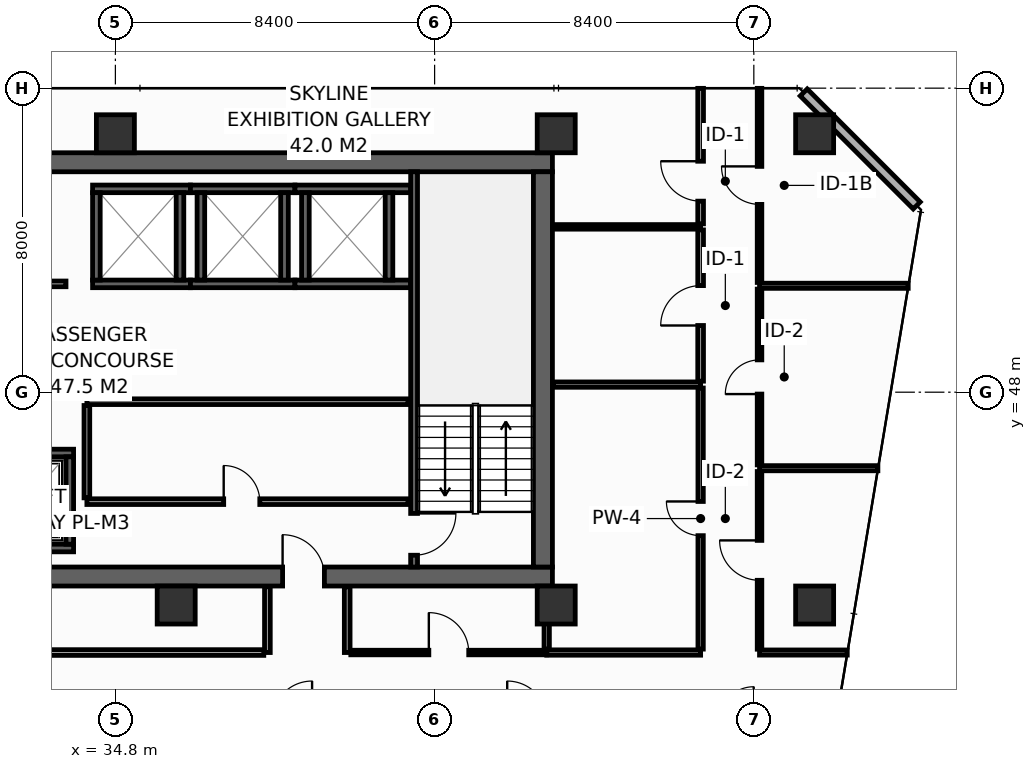
"""IFC4 building model, lengths in metres.
Left out: names, types, materials, properties, quantities, classifications, styles, units other than length and angle.
Written with IfcOpenShell. Run it as: python <this file> out.ifc"""

import sys

from ifc_helpers import new_model, si_unit, direction, frame, frame_2d, origin, origin_2d, place, context, subcontext, project, spatial, rectangle, hollow_rectangle, extrude, element, fill, save


model = new_model("IFC4")
c1 = context("Model", 3, precision=1e-05, world=origin(), true_north=direction((0.0, 1.0)))
c2 = subcontext(c1, "Body", "Model", "MODEL_VIEW")
j1 = project(units=[si_unit("LENGTHUNIT", "METRE"), si_unit("PLANEANGLEUNIT", "RADIAN")], contexts=[c1])
p1 = place(None, origin())
s1 = spatial("IfcSite", under=j1, at=p1, CompositionType="ELEMENT")
p2 = place(p1, origin())
s2 = spatial("IfcBuilding", under=s1, at=p2, CompositionType="ELEMENT")
p3 = place(p2, frame((0.0, 0.0, 152.4)))
s3 = spatial("IfcBuildingStorey", under=s2, at=p3, CompositionType="ELEMENT", Elevation=152.4)
p4 = place(p3, frame((13.6, 43.15, 0.0), z_axis=(0.0, 0.0, 1.0), x_axis=(1.0, 0.0, 0.0)))
e1 = element("IfcWall", 1, at=p4, inside=s3, PredefinedType="SHEAR", context=c2, shape_type="SweptSolid", body=[
    extrude(rectangle(XDim=32.7, YDim=0.5, at=frame_2d((16.35, 0.0))), origin(), (0.0, 0.0, 1.0), 3.55),
])
p5 = place(p4, frame((5.4, 0.0, 0.0)))
e2 = element("IfcOpeningElement", 2, at=p5, cuts=e1, PredefinedType="OPENING", context=c2, shape_type="SweptSolid", body=[
    extrude(rectangle(XDim=1.1, YDim=2.15, at=frame_2d((0.55, 1.075))), frame((0.0, 0.26, 0.0), z_axis=(0.0, -1.0, 0.0), x_axis=(1.0, 0.0, 0.0)), (0.0, 0.0, 1.0), 0.52),
])
p6 = place(p4, frame((25.6, 0.0, 0.0)))
e3 = element("IfcOpeningElement", 3, at=p6, cuts=e1, PredefinedType="OPENING", context=c2, shape_type="SweptSolid", body=[
    extrude(rectangle(XDim=1.1, YDim=2.15, at=frame_2d((0.55, 1.075))), frame((0.0, 0.26, 0.0), z_axis=(0.0, -1.0, 0.0), x_axis=(1.0, 0.0, 0.0)), (0.0, 0.0, 1.0), 0.52),
])
p7 = place(p3, frame((13.6, 54.05, 0.0), z_axis=(0.0, 0.0, 1.0), x_axis=(1.0, 0.0, 0.0)))
e4 = element("IfcWall", 4, at=p7, inside=s3, PredefinedType="SHEAR", context=c2, shape_type="SweptSolid", body=[
    extrude(rectangle(XDim=32.7, YDim=0.5, at=frame_2d((16.35, 0.0))), origin(), (0.0, 0.0, 1.0), 3.55),
])
p8 = place(p3, frame((46.05, 43.4, 0.0), z_axis=(0.0, 0.0, 1.0), x_axis=(0.0, 1.0, 0.0)))
e5 = element("IfcWall", 5, at=p8, inside=s3, PredefinedType="SHEAR", context=c2, shape_type="SweptSolid", body=[
    extrude(rectangle(XDim=10.4, YDim=0.5, at=frame_2d((5.2, 0.0))), origin(), (0.0, 0.0, 1.0), 3.55),
])
for number, where, z_axis, x_axis in (
    (6, (34.8, 54.8, 0.0), (0.0, 0.0, 1.0), (1.0, 0.0, 0.0)),
    (7, (46.4, 54.8, 0.0), (0.0, 0.0, 1.0), (1.0, 0.0, 0.0)),
    (8, (53.2, 54.8, 0.0), (0.0, 0.0, 1.0), (1.0, 0.0, 0.0)),
    (9, (36.4, 42.4, 0.0), (0.0, 0.0, 1.0), (1.0, 0.0, 0.0)),
    (10, (46.4, 42.4, 0.0), (0.0, 0.0, 1.0), (1.0, 0.0, 0.0)),
    (11, (53.2, 42.4, 0.0), (0.0, 0.0, 1.0), (1.0, 0.0, 0.0)),
):
    element("IfcColumn", number, at=place(p3, frame(where, z_axis=z_axis, x_axis=x_axis)), inside=s3, PredefinedType="COLUMN", context=c2, shape_type="SweptSolid", body=[
        extrude(hollow_rectangle(XDim=1.0, YDim=1.0, WallThickness=0.045, at=origin_2d()), origin(), (0.0, 0.0, 1.0), 3.8),
    ])
p9 = place(p3, frame((31.125, 43.9, 0.0), z_axis=(0.0, 0.0, 1.0), x_axis=(1.0, 0.0, 0.0)))
e12 = element("IfcWall", 12, at=p9, inside=s3, PredefinedType="SHEAR", context=c2, shape_type="SweptSolid", body=[
    extrude(rectangle(XDim=2.575, YDim=0.2, at=frame_2d((1.288, 0.0))), origin(), (0.0, 0.0, 1.0), 3.55),
])
p10 = place(p3, frame((31.125, 46.4, 0.0), z_axis=(0.0, 0.0, 1.0), x_axis=(1.0, 0.0, 0.0)))
e13 = element("IfcWall", 13, at=p10, inside=s3, PredefinedType="SHEAR", context=c2, shape_type="SweptSolid", body=[
    extrude(rectangle(XDim=2.575, YDim=0.2, at=frame_2d((1.288, 0.0))), origin(), (0.0, 0.0, 1.0), 3.55),
])
p11 = place(p10, frame((0.825, 0.0, 0.0)))
e14 = element("IfcOpeningElement", 14, at=p11, cuts=e13, PredefinedType="OPENING", context=c2, shape_type="SweptSolid", body=[
    extrude(rectangle(XDim=1.1, YDim=2.2, at=frame_2d((0.55, 1.1))), frame((0.0, 0.11, 0.0), z_axis=(0.0, -1.0, 0.0), x_axis=(1.0, 0.0, 0.0)), (0.0, 0.0, 1.0), 0.22),
])
p12 = place(p3, frame((33.6, 44.0, 0.0), z_axis=(0.0, 0.0, 1.0), x_axis=(0.0, 1.0, 0.0)))
e15 = element("IfcWall", 15, at=p12, inside=s3, PredefinedType="SHEAR", context=c2, shape_type="SweptSolid", body=[
    extrude(rectangle(XDim=2.3, YDim=0.2, at=frame_2d((1.15, 0.0))), origin(), (0.0, 0.0, 1.0), 3.55),
])
for number, where, z_axis, x_axis in (
    (16, (34.2, 50.85, 0.0), (0.0, 0.0, 1.0), (1.0, 0.0, 0.0)),
    (17, (34.2, 53.35, 0.0), (0.0, 0.0, 1.0), (1.0, 0.0, 0.0)),
):
    element("IfcWall", number, at=place(p3, frame(where, z_axis=z_axis, x_axis=x_axis)), inside=s3, PredefinedType="SHEAR", context=c2, shape_type="SweptSolid", body=[
        extrude(rectangle(XDim=2.575, YDim=0.2, at=frame_2d((1.288, 0.0))), origin(), (0.0, 0.0, 1.0), 3.55),
    ])
for number, where, z_axis, x_axis in (
    (18, (34.3, 50.95, 0.0), (0.0, 0.0, 1.0), (0.0, 1.0, 0.0)),
    (19, (36.5, 50.95, 0.0), (0.0, 0.0, 1.0), (0.0, 1.0, 0.0)),
):
    element("IfcWall", number, at=place(p3, frame(where, z_axis=z_axis, x_axis=x_axis)), inside=s3, PredefinedType="SHEAR", context=c2, shape_type="SweptSolid", body=[
        extrude(rectangle(XDim=2.3, YDim=0.2, at=frame_2d((1.15, 0.0))), origin(), (0.0, 0.0, 1.0), 3.55),
    ])
for number, where, z_axis, x_axis in (
    (20, (36.775, 50.85, 0.0), (0.0, 0.0, 1.0), (1.0, 0.0, 0.0)),
    (21, (36.775, 53.35, 0.0), (0.0, 0.0, 1.0), (1.0, 0.0, 0.0)),
):
    element("IfcWall", number, at=place(p3, frame(where, z_axis=z_axis, x_axis=x_axis)), inside=s3, PredefinedType="SHEAR", context=c2, shape_type="SweptSolid", body=[
        extrude(rectangle(XDim=2.75, YDim=0.2, at=frame_2d((1.375, 0.0))), origin(), (0.0, 0.0, 1.0), 3.55),
    ])
for number, where, z_axis, x_axis in (
    (22, (37.05, 50.95, 0.0), (0.0, 0.0, 1.0), (0.0, 1.0, 0.0)),
    (23, (39.25, 50.95, 0.0), (0.0, 0.0, 1.0), (0.0, 1.0, 0.0)),
):
    element("IfcWall", number, at=place(p3, frame(where, z_axis=z_axis, x_axis=x_axis)), inside=s3, PredefinedType="SHEAR", context=c2, shape_type="SweptSolid", body=[
        extrude(rectangle(XDim=2.3, YDim=0.2, at=frame_2d((1.15, 0.0))), origin(), (0.0, 0.0, 1.0), 3.55),
    ])
for number, where, z_axis, x_axis in (
    (24, (39.525, 50.85, 0.0), (0.0, 0.0, 1.0), (1.0, 0.0, 0.0)),
    (25, (39.525, 53.35, 0.0), (0.0, 0.0, 1.0), (1.0, 0.0, 0.0)),
):
    element("IfcWall", number, at=place(p3, frame(where, z_axis=z_axis, x_axis=x_axis)), inside=s3, PredefinedType="SHEAR", context=c2, shape_type="SweptSolid", body=[
        extrude(rectangle(XDim=3.045, YDim=0.2, at=frame_2d((1.522, 0.0))), origin(), (0.0, 0.0, 1.0), 3.55),
    ])
for number, where, z_axis, x_axis in (
    (26, (39.8, 50.95, 0.0), (0.0, 0.0, 1.0), (0.0, 1.0, 0.0)),
    (27, (42.0, 50.95, 0.0), (0.0, 0.0, 1.0), (0.0, 1.0, 0.0)),
):
    element("IfcWall", number, at=place(p3, frame(where, z_axis=z_axis, x_axis=x_axis)), inside=s3, PredefinedType="SHEAR", context=c2, shape_type="SweptSolid", body=[
        extrude(rectangle(XDim=2.3, YDim=0.2, at=frame_2d((1.15, 0.0))), origin(), (0.0, 0.0, 1.0), 3.55),
    ])
p13 = place(p3, frame((42.66, 53.8, 0.0), z_axis=(0.0, 0.0, 1.0), x_axis=(0.0, -1.0, 0.0)))
e28 = element("IfcWall", 28, at=p13, inside=s3, PredefinedType="SHEAR", context=c2, shape_type="SweptSolid", body=[
    extrude(rectangle(XDim=10.4, YDim=0.18, at=frame_2d((5.2, 0.0))), origin(), (0.0, 0.0, 1.0), 3.55),
])
p14 = place(p13, frame((8.99, 0.0, 0.0)))
e29 = element("IfcOpeningElement", 29, at=p14, cuts=e28, PredefinedType="OPENING", context=c2, shape_type="SweptSolid", body=[
    extrude(rectangle(XDim=1.1, YDim=2.15, at=frame_2d((0.55, 1.075))), frame((0.0, 0.1, 0.0), z_axis=(0.0, -1.0, 0.0), x_axis=(1.0, 0.0, 0.0)), (0.0, 0.0, 1.0), 0.2),
])
p15 = place(p3, frame((34.05, 45.12, 0.0), z_axis=(0.0, 0.0, 1.0), x_axis=(1.0, 0.0, 0.0)))
e30 = element("IfcWall", 30, at=p15, inside=s3, PredefinedType="PARTITIONING", context=c2, shape_type="SweptSolid", body=[
    extrude(rectangle(XDim=8.45, YDim=0.15, at=frame_2d((4.225, 0.0))), origin(), (0.0, 0.0, 1.0), 3.55),
])
p16 = place(p15, frame((3.6, 0.0, 0.0)))
e31 = element("IfcOpeningElement", 31, at=p16, cuts=e30, PredefinedType="OPENING", context=c2, shape_type="SweptSolid", body=[
    extrude(rectangle(XDim=0.95, YDim=2.15, at=frame_2d((0.475, 1.075))), frame((0.0, 0.085, 0.0), z_axis=(0.0, -1.0, 0.0), x_axis=(1.0, 0.0, 0.0)), (0.0, 0.0, 1.0), 0.17),
])
p17 = place(p3, frame((34.05, 47.75, 0.0), z_axis=(0.0, 0.0, 1.0), x_axis=(1.0, 0.0, 0.0)))
e32 = element("IfcWall", 32, at=p17, inside=s3, PredefinedType="PARTITIONING", context=c2, shape_type="SweptSolid", body=[
    extrude(rectangle(XDim=8.45, YDim=0.15, at=frame_2d((4.225, 0.0))), origin(), (0.0, 0.0, 1.0), 3.55),
])
p18 = place(p3, frame((34.05, 45.22, 0.0), z_axis=(0.0, 0.0, 1.0), x_axis=(0.0, 1.0, 0.0)))
e33 = element("IfcWall", 33, at=p18, inside=s3, PredefinedType="PARTITIONING", context=c2, shape_type="SweptSolid", body=[
    extrude(rectangle(XDim=2.43, YDim=0.15, at=frame_2d((1.215, 0.0))), origin(), (0.0, 0.0, 1.0), 3.55),
])
p19 = place(p3, frame((25.85, 50.85, 0.0), z_axis=(0.0, 0.0, 1.0), x_axis=(1.0, 0.0, 0.0)))
e34 = element("IfcWall", 34, at=p19, inside=s3, PredefinedType="PARTITIONING", context=c2, shape_type="SweptSolid", body=[
    extrude(rectangle(XDim=7.65, YDim=0.15, at=frame_2d((3.825, 0.0))), origin(), (0.0, 0.0, 1.0), 3.55),
])
p20 = place(p19, frame((1.25, 0.0, 0.0)))
e35 = element("IfcOpeningElement", 35, at=p20, cuts=e34, PredefinedType="OPENING", context=c2, shape_type="SweptSolid", body=[
    extrude(rectangle(XDim=0.95, YDim=2.15, at=frame_2d((0.475, 1.075))), frame((0.0, 0.085, 0.0), z_axis=(0.0, -1.0, 0.0), x_axis=(1.0, 0.0, 0.0)), (0.0, 0.0, 1.0), 0.17),
])
p21 = place(p19, frame((5.05, 0.0, 0.0)))
e36 = element("IfcOpeningElement", 36, at=p21, cuts=e34, PredefinedType="OPENING", context=c2, shape_type="SweptSolid", body=[
    extrude(rectangle(XDim=0.95, YDim=2.15, at=frame_2d((0.475, 1.075))), frame((0.0, 0.085, 0.0), z_axis=(0.0, -1.0, 0.0), x_axis=(1.0, 0.0, 0.0)), (0.0, 0.0, 1.0), 0.17),
])
p22 = place(p3, frame((55.887, 52.913, 0.0), z_axis=(0.0, 0.0, 1.0), x_axis=(-0.707106781187, 0.707106781187, 0.0)))
e37 = element("IfcWall", 37, at=p22, inside=s3, PredefinedType="STANDARD", context=c2, shape_type="SweptSolid", body=[
    extrude(rectangle(XDim=4.206, YDim=0.26, at=frame_2d((2.103, 0.0))), origin(), (0.0, 0.0, 1.0), 3.55),
])
p23 = place(p3, frame((46.15, 41.15, 0.0), z_axis=(0.0, 0.0, 1.0), x_axis=(1.0, 0.0, 0.0)))
e38 = element("IfcWall", 38, at=p23, inside=s3, PredefinedType="PARTITIONING", context=c2, shape_type="SweptSolid", body=[
    extrude(rectangle(XDim=4.05, YDim=0.14, at=frame_2d((2.025, 0.0))), origin(), (0.0, 0.0, 1.0), 3.55),
])
p24 = place(p3, frame((46.15, 41.24, 0.0), z_axis=(0.0, 0.0, 1.0), x_axis=(0.0, 1.0, 0.0)))
e39 = element("IfcWall", 39, at=p24, inside=s3, PredefinedType="PARTITIONING", context=c2, shape_type="SweptSolid", body=[
    extrude(rectangle(XDim=1.64, YDim=0.14, at=frame_2d((0.82, 0.0))), origin(), (0.0, 0.0, 1.0), 3.55),
])
p25 = place(p3, frame((46.32, 48.2, 0.0), z_axis=(0.0, 0.0, 1.0), x_axis=(1.0, 0.0, 0.0)))
e40 = element("IfcWall", 40, at=p25, inside=s3, PredefinedType="PARTITIONING", context=c2, shape_type="SweptSolid", body=[
    extrude(rectangle(XDim=3.88, YDim=0.14, at=frame_2d((1.94, 0.0))), origin(), (0.0, 0.0, 1.0), 3.55),
])
p26 = place(p3, frame((50.2, 41.24, 0.0), z_axis=(0.0, 0.0, 1.0), x_axis=(0.0, 1.0, 0.0)))
e41 = element("IfcWall", 41, at=p26, inside=s3, PredefinedType="PARTITIONING", context=c2, shape_type="SweptSolid", body=[
    extrude(rectangle(XDim=6.87, YDim=0.14, at=frame_2d((3.435, 0.0))), origin(), (0.0, 0.0, 1.0), 2.835),
])
p27 = place(p26, frame((2.985, 0.0, 0.0)))
e42 = element("IfcOpeningElement", 42, at=p27, cuts=e41, PredefinedType="OPENING", context=c2, shape_type="SweptSolid", body=[
    extrude(rectangle(XDim=0.9, YDim=2.1, at=frame_2d((0.45, 1.05))), frame((0.0, 0.08, 0.0), z_axis=(0.0, -1.0, 0.0), x_axis=(1.0, 0.0, 0.0)), (0.0, 0.0, 1.0), 0.16),
])
p28 = place(p3, frame((46.32, 52.35, 0.0), z_axis=(0.0, 0.0, 1.0), x_axis=(1.0, 0.0, 0.0)))
e43 = element("IfcWall", 43, at=p28, inside=s3, PredefinedType="PARTITIONING", context=c2, shape_type="SweptSolid", body=[
    extrude(rectangle(XDim=3.88, YDim=0.12, at=frame_2d((1.94, 0.0))), origin(), (0.0, 0.0, 1.0), 3.55),
])
p29 = place(p3, frame((50.2, 48.29, 0.0), z_axis=(0.0, 0.0, 1.0), x_axis=(0.0, 1.0, 0.0)))
e44 = element("IfcWall", 44, at=p29, inside=s3, PredefinedType="PARTITIONING", context=c2, shape_type="SweptSolid", body=[
    extrude(rectangle(XDim=3.98, YDim=0.15, at=frame_2d((1.99, 0.0))), origin(), (0.0, 0.0, 1.0), 3.55),
])
p30 = place(p29, frame((1.465, 0.0, 0.0)))
e45 = element("IfcOpeningElement", 45, at=p30, cuts=e44, PredefinedType="OPENING", context=c2, shape_type="SweptSolid", body=[
    extrude(rectangle(XDim=1.05, YDim=2.15, at=frame_2d((0.525, 1.075))), frame((0.0, 0.085, 0.0), z_axis=(0.0, -1.0, 0.0), x_axis=(1.0, 0.0, 0.0)), (0.0, 0.0, 1.0), 0.17),
])
p31 = place(p3, frame((50.2, 52.43, 0.0), z_axis=(0.0, 0.0, 1.0), x_axis=(0.0, 1.0, 0.0)))
e46 = element("IfcWall", 46, at=p31, inside=s3, PredefinedType="PARTITIONING", context=c2, shape_type="SweptSolid", body=[
    extrude(rectangle(XDim=3.565, YDim=0.15, at=frame_2d((1.783, 0.0))), origin(), (0.0, 0.0, 1.0), 2.935),
])
p32 = place(p31, frame((0.597, 0.0, 0.0)))
e47 = element("IfcOpeningElement", 47, at=p32, cuts=e46, PredefinedType="OPENING", context=c2, shape_type="SweptSolid", body=[
    extrude(rectangle(XDim=1.05, YDim=2.15, at=frame_2d((0.525, 1.075))), frame((0.0, 0.085, 0.0), z_axis=(0.0, -1.0, 0.0), x_axis=(1.0, 0.0, 0.0)), (0.0, 0.0, 1.0), 0.17),
])
p33 = place(p3, frame((51.75, 41.15, 0.0), z_axis=(0.0, 0.0, 1.0), x_axis=(1.0, 0.0, 0.0)))
e48 = element("IfcWall", 48, at=p33, inside=s3, PredefinedType="PARTITIONING", context=c2, shape_type="SweptSolid", body=[
    extrude(rectangle(XDim=2.308, YDim=0.135, at=frame_2d((1.154, 0.0))), origin(), (0.0, 0.0, 1.0), 3.035),
])
p34 = place(p3, frame((51.75, 46.0, 0.0), z_axis=(0.0, 0.0, 1.0), x_axis=(1.0, 0.0, 0.0)))
e49 = element("IfcWall", 49, at=p34, inside=s3, PredefinedType="PARTITIONING", context=c2, shape_type="SweptSolid", body=[
    extrude(rectangle(XDim=3.115, YDim=0.135, at=frame_2d((1.557, 0.0))), origin(), (0.0, 0.0, 1.0), 2.835),
])
p35 = place(p3, frame((51.75, 50.8, 0.0), z_axis=(0.0, 0.0, 1.0), x_axis=(1.0, 0.0, 0.0)))
e50 = element("IfcWall", 50, at=p35, inside=s3, PredefinedType="PARTITIONING", context=c2, shape_type="SweptSolid", body=[
    extrude(rectangle(XDim=3.912, YDim=0.135, at=frame_2d((1.956, 0.0))), origin(), (0.0, 0.0, 1.0), 2.835),
])
p36 = place(p3, frame((51.75, 41.238, 0.0), z_axis=(0.0, 0.0, 1.0), x_axis=(0.0, 1.0, 0.0)))
e51 = element("IfcWall", 51, at=p36, inside=s3, PredefinedType="PARTITIONING", context=c2, shape_type="SweptSolid", body=[
    extrude(rectangle(XDim=4.675, YDim=0.12, at=frame_2d((2.337, 0.0))), origin(), (0.0, 0.0, 1.0), 2.835),
])
p37 = place(p36, frame((1.813, 0.0, 0.0)))
e52 = element("IfcOpeningElement", 52, at=p37, cuts=e51, PredefinedType="OPENING", context=c2, shape_type="SweptSolid", body=[
    extrude(rectangle(XDim=1.05, YDim=2.15, at=frame_2d((0.525, 1.075))), frame((0.0, 0.07, 0.0), z_axis=(0.0, -1.0, 0.0), x_axis=(1.0, 0.0, 0.0)), (0.0, 0.0, 1.0), 0.14),
])
p38 = place(p3, frame((51.75, 46.087, 0.0), z_axis=(0.0, 0.0, 1.0), x_axis=(0.0, 1.0, 0.0)))
e53 = element("IfcWall", 53, at=p38, inside=s3, PredefinedType="PARTITIONING", context=c2, shape_type="SweptSolid", body=[
    extrude(rectangle(XDim=4.625, YDim=0.12, at=frame_2d((2.312, 0.0))), origin(), (0.0, 0.0, 1.0), 3.55),
])
p39 = place(p38, frame((1.863, 0.0, 0.0)))
e54 = element("IfcOpeningElement", 54, at=p39, cuts=e53, PredefinedType="OPENING", context=c2, shape_type="SweptSolid", body=[
    extrude(rectangle(XDim=0.9, YDim=2.1, at=frame_2d((0.45, 1.05))), frame((0.0, 0.07, 0.0), z_axis=(0.0, -1.0, 0.0), x_axis=(1.0, 0.0, 0.0)), (0.0, 0.0, 1.0), 0.14),
])
p40 = place(p3, frame((51.75, 50.887, 0.0), z_axis=(0.0, 0.0, 1.0), x_axis=(0.0, 1.0, 0.0)))
e55 = element("IfcWall", 55, at=p40, inside=s3, PredefinedType="PARTITIONING", context=c2, shape_type="SweptSolid", body=[
    extrude(rectangle(XDim=5.108, YDim=0.12, at=frame_2d((2.554, 0.0))), origin(), (0.0, 0.0, 1.0), 2.935),
])
p41 = place(p40, frame((2.054, 0.0, 0.0)))
e56 = element("IfcOpeningElement", 56, at=p41, cuts=e55, PredefinedType="OPENING", context=c2, shape_type="SweptSolid", body=[
    extrude(rectangle(XDim=1.0, YDim=2.15, at=frame_2d((0.5, 1.075))), frame((0.0, 0.07, 0.0), z_axis=(0.0, -1.0, 0.0), x_axis=(1.0, 0.0, 0.0)), (0.0, 0.0, 1.0), 0.14),
])
for number, where, z_axis, x_axis in (
    (57, (38.8, 41.15, 0.0), (0.0, 0.0, 1.0), (0.0, 1.0, 0.0)),
    (58, (40.9, 41.15, 0.0), (0.0, 0.0, 1.0), (0.0, 1.0, 0.0)),
):
    element("IfcWall", number, at=place(p3, frame(where, z_axis=z_axis, x_axis=x_axis)), inside=s3, PredefinedType="PARTITIONING", context=c2, shape_type="SweptSolid", body=[
        extrude(rectangle(XDim=1.73, YDim=0.15, at=frame_2d((0.865, 0.0))), origin(), (0.0, 0.0, 1.0), 3.55),
    ])
p42 = place(p3, frame((20.795, 41.15, 0.0), z_axis=(0.0, 0.0, 1.0), x_axis=(1.0, 0.0, 0.0)))
e59 = element("IfcWall", 59, at=p42, inside=s3, PredefinedType="PARTITIONING", context=c2, shape_type="SweptSolid", body=[
    extrude(rectangle(XDim=17.91, YDim=0.15, at=frame_2d((8.955, 0.0))), origin(), (0.0, 0.0, 1.0), 2.835),
])
p43 = place(p42, frame((8.43, 0.0, 0.0)))
e60 = element("IfcOpeningElement", 60, at=p43, cuts=e59, PredefinedType="OPENING", context=c2, shape_type="SweptSolid", body=[
    extrude(rectangle(XDim=1.05, YDim=2.15, at=frame_2d((0.525, 1.075))), frame((0.0, 0.085, 0.0), z_axis=(0.0, -1.0, 0.0), x_axis=(1.0, 0.0, 0.0)), (0.0, 0.0, 1.0), 0.17),
])
p44 = place(p3, frame((40.995, 41.15, 0.0), z_axis=(0.0, 0.0, 1.0), x_axis=(1.0, 0.0, 0.0)))
e61 = element("IfcWall", 61, at=p44, inside=s3, PredefinedType="PARTITIONING", context=c2, shape_type="SweptSolid", body=[
    extrude(rectangle(XDim=5.155, YDim=0.12, at=frame_2d((2.577, 0.0))), origin(), (0.0, 0.0, 1.0), 3.55),
])
p45 = place(p44, frame((2.053, 0.0, 0.0)))
e62 = element("IfcOpeningElement", 62, at=p45, cuts=e61, PredefinedType="OPENING", context=c2, shape_type="SweptSolid", body=[
    extrude(rectangle(XDim=1.05, YDim=2.15, at=frame_2d((0.525, 1.075))), frame((0.0, 0.07, 0.0), z_axis=(0.0, -1.0, 0.0), x_axis=(1.0, 0.0, 0.0)), (0.0, 0.0, 1.0), 0.14),
])
p46 = place(p14, origin())
e63 = element("IfcDoor", 63, at=p46, inside=s3, OperationType="SINGLE_SWING_LEFT", PredefinedType="DOOR", context=c2, shape_type="SweptSolid", body=[
    extrude(rectangle(XDim=1.1, YDim=2.15, at=frame_2d((0.55, 1.075))), frame((0.0, 0.025, 0.0), z_axis=(0.0, -1.0, 0.0), x_axis=(1.0, 0.0, 0.0)), (0.0, 0.0, 1.0), 0.05),
])
fill(e29, e63)
p47 = place(p6, origin())
e64 = element("IfcDoor", 64, at=p47, inside=s3, OperationType="SINGLE_SWING_LEFT", PredefinedType="DOOR", context=c2, shape_type="SweptSolid", body=[
    extrude(rectangle(XDim=1.1, YDim=2.15, at=frame_2d((0.55, 1.075))), frame((0.0, 0.025, 0.0), z_axis=(0.0, -1.0, 0.0), x_axis=(1.0, 0.0, 0.0)), (0.0, 0.0, 1.0), 0.05),
])
fill(e3, e64)
p48 = place(p16, origin())
e65 = element("IfcDoor", 65, at=p48, inside=s3, OperationType="SINGLE_SWING_LEFT", PredefinedType="DOOR", context=c2, shape_type="SweptSolid", body=[
    extrude(rectangle(XDim=0.95, YDim=2.15, at=frame_2d((0.475, 1.075))), frame((0.0, 0.025, 0.0), z_axis=(0.0, -1.0, 0.0), x_axis=(1.0, 0.0, 0.0)), (0.0, 0.0, 1.0), 0.05),
])
fill(e31, e65)
p49 = place(p27, origin())
e66 = element("IfcDoor", 66, at=p49, inside=s3, OperationType="SINGLE_SWING_RIGHT", PredefinedType="DOOR", context=c2, shape_type="SweptSolid", body=[
    extrude(rectangle(XDim=0.9, YDim=2.1, at=frame_2d((0.45, 1.05))), frame((0.0, 0.025, 0.0), z_axis=(0.0, -1.0, 0.0), x_axis=(1.0, 0.0, 0.0)), (0.0, 0.0, 1.0), 0.05),
])
fill(e42, e66)
p50 = place(p30, origin())
e67 = element("IfcDoor", 67, at=p50, inside=s3, OperationType="SINGLE_SWING_LEFT", PredefinedType="DOOR", context=c2, shape_type="SweptSolid", body=[
    extrude(rectangle(XDim=1.05, YDim=2.15, at=frame_2d((0.525, 1.075))), frame((0.0, 0.025, 0.0), z_axis=(0.0, -1.0, 0.0), x_axis=(1.0, 0.0, 0.0)), (0.0, 0.0, 1.0), 0.05),
])
fill(e45, e67)
p51 = place(p32, origin())
e68 = element("IfcDoor", 68, at=p51, inside=s3, OperationType="SINGLE_SWING_RIGHT", PredefinedType="DOOR", context=c2, shape_type="SweptSolid", body=[
    extrude(rectangle(XDim=1.05, YDim=2.15, at=frame_2d((0.525, 1.075))), frame((0.0, 0.025, 0.0), z_axis=(0.0, -1.0, 0.0), x_axis=(1.0, 0.0, 0.0)), (0.0, 0.0, 1.0), 0.05),
])
fill(e47, e68)
p52 = place(p37, origin())
e69 = element("IfcDoor", 69, at=p52, inside=s3, OperationType="SINGLE_SWING_RIGHT", PredefinedType="DOOR", context=c2, shape_type="SweptSolid", body=[
    extrude(rectangle(XDim=1.05, YDim=2.15, at=frame_2d((0.525, 1.075))), frame((0.0, 0.025, 0.0), z_axis=(0.0, -1.0, 0.0), x_axis=(1.0, 0.0, 0.0)), (0.0, 0.0, 1.0), 0.05),
])
fill(e52, e69)
p53 = place(p39, origin())
e70 = element("IfcDoor", 70, at=p53, inside=s3, OperationType="SINGLE_SWING_LEFT", PredefinedType="DOOR", context=c2, shape_type="SweptSolid", body=[
    extrude(rectangle(XDim=0.9, YDim=2.1, at=frame_2d((0.45, 1.05))), frame((0.0, 0.025, 0.0), z_axis=(0.0, -1.0, 0.0), x_axis=(1.0, 0.0, 0.0)), (0.0, 0.0, 1.0), 0.05),
])
fill(e54, e70)
p54 = place(p41, origin())
e71 = element("IfcDoor", 71, at=p54, inside=s3, OperationType="SINGLE_SWING_RIGHT", PredefinedType="DOOR", context=c2, shape_type="SweptSolid", body=[
    extrude(rectangle(XDim=1.0, YDim=2.15, at=frame_2d((0.5, 1.075))), frame((0.0, 0.025, 0.0), z_axis=(0.0, -1.0, 0.0), x_axis=(1.0, 0.0, 0.0)), (0.0, 0.0, 1.0), 0.05),
])
fill(e56, e71)
p55 = place(p45, origin())
e72 = element("IfcDoor", 72, at=p55, inside=s3, OperationType="SINGLE_SWING_LEFT", PredefinedType="DOOR", context=c2, shape_type="SweptSolid", body=[
    extrude(rectangle(XDim=1.05, YDim=2.15, at=frame_2d((0.525, 1.075))), frame((0.0, 0.025, 0.0), z_axis=(0.0, -1.0, 0.0), x_axis=(1.0, 0.0, 0.0)), (0.0, 0.0, 1.0), 0.05),
])
fill(e62, e72)
save(model, sys.argv[1])
